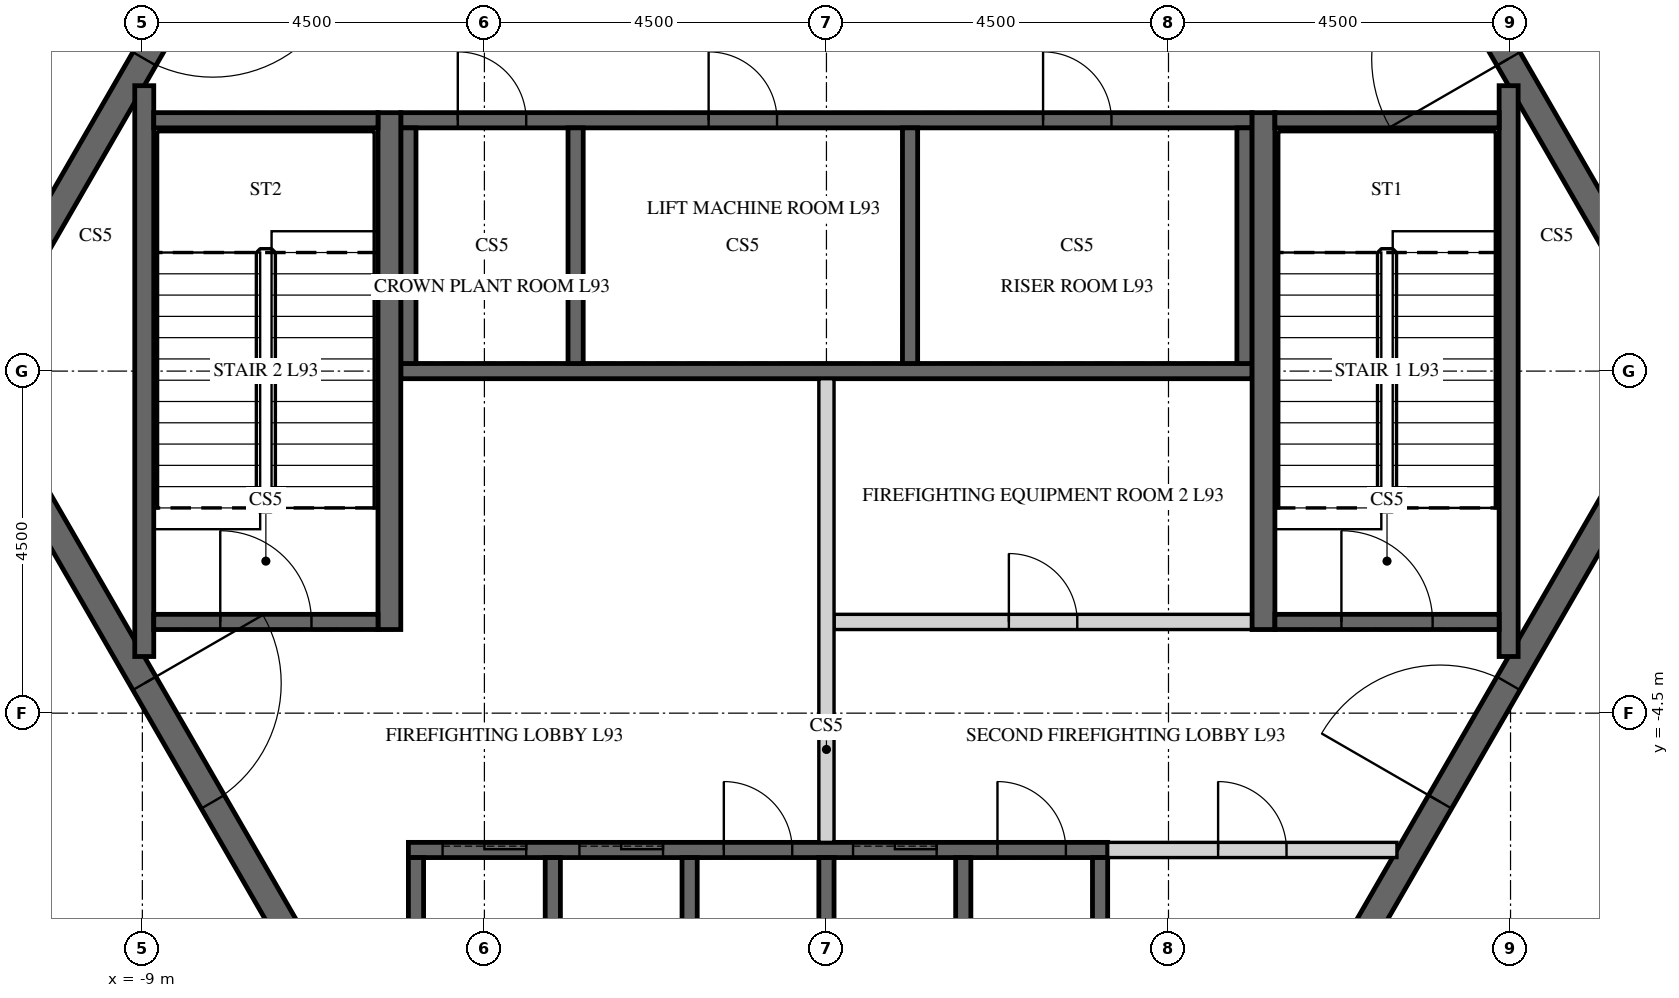
"""IFC4 building model, lengths in metres.
Left out: names, types, materials, properties, quantities, classifications, styles, units other than length and angle.
Written with IfcOpenShell. Run it as: python <this file> out.ifc"""

import sys

from ifc_helpers import new_model, si_unit, direction, frame, frame_2d, origin, place, context, subcontext, project, spatial, polyline, rectangle, outline, extrude, element, fill, save


model = new_model("IFC4")
c1 = context("Model", 3, precision=1e-05, world=origin(), true_north=direction((0.0, 1.0)))
c2 = subcontext(c1, "Body", "Model", "MODEL_VIEW")
j1 = project(units=[si_unit("LENGTHUNIT", "METRE"), si_unit("PLANEANGLEUNIT", "RADIAN")], contexts=[c1])
p1 = place(None, origin())
s1 = spatial("IfcSite", under=j1, at=p1, CompositionType="ELEMENT")
p2 = place(p1, origin())
s2 = spatial("IfcBuilding", under=s1, at=p2, CompositionType="ELEMENT")
p3 = place(p2, frame((0.0, 0.0, 392.7)))
s3 = spatial("IfcBuildingStorey", under=s2, at=p3, CompositionType="ELEMENT", Elevation=392.7)
p4 = place(p3, frame((-5.673, 9.825, -0.2), z_axis=(0.0, 0.0, 1.0), x_axis=(-0.499995046907, -0.866028263435, 0.0)))
e1 = element("IfcWall", 1, at=p4, inside=s3, PredefinedType="SHEAR", context=c2, shape_type="SweptSolid", body=[
    extrude(outline(polyline([(-0.101, -0.175), (11.446, -0.175), (11.244, 0.175), (0.101, 0.175), (-0.101, -0.175)])), origin(), (0.0, 0.0, 1.0), 4.5),
])
p5 = place(p4, frame((4.801, 0.0, 0.2)))
e2 = element("IfcOpeningElement", 2, at=p5, cuts=e1, PredefinedType="OPENING", context=c2, shape_type="SweptSolid", body=[
    extrude(rectangle(XDim=1.8, YDim=2.4, at=frame_2d((0.9, 1.2))), frame((0.0, 0.185, 0.0), z_axis=(0.0, -1.0, 0.0), x_axis=(1.0, 0.0, 0.0)), (0.0, 0.0, 1.0), 0.37),
])
p6 = place(p3, frame((-11.345, 0.0, -0.2), z_axis=(0.0, 0.0, 1.0), x_axis=(0.499995046907, -0.866028263435, 0.0)))
e3 = element("IfcWall", 3, at=p6, inside=s3, PredefinedType="SHEAR", context=c2, shape_type="SweptSolid", body=[
    extrude(outline(polyline([(-0.101, -0.175), (11.446, -0.175), (11.244, 0.175), (0.101, 0.175), (-0.101, -0.175)])), origin(), (0.0, 0.0, 1.0), 4.5),
])
p7 = place(p6, frame((4.744, 0.0, 0.2)))
e4 = element("IfcOpeningElement", 4, at=p7, cuts=e3, PredefinedType="OPENING", context=c2, shape_type="SweptSolid", body=[
    extrude(rectangle(XDim=1.8, YDim=2.4, at=frame_2d((0.9, 1.2))), frame((0.0, 0.185, 0.0), z_axis=(0.0, -1.0, 0.0), x_axis=(1.0, 0.0, 0.0)), (0.0, 0.0, 1.0), 0.37),
])
p8 = place(p3, frame((5.673, -9.825, -0.2), z_axis=(0.0, 0.0, 1.0), x_axis=(0.499995046907, 0.866028263435, 0.0)))
e5 = element("IfcWall", 5, at=p8, inside=s3, PredefinedType="SHEAR", context=c2, shape_type="SweptSolid", body=[
    extrude(outline(polyline([(-0.101, -0.175), (11.446, -0.175), (11.244, 0.175), (0.101, 0.175), (-0.101, -0.175)])), origin(), (0.0, 0.0, 1.0), 4.5),
])
p9 = place(p8, frame((4.801, 0.0, 0.2)))
e6 = element("IfcOpeningElement", 6, at=p9, cuts=e5, PredefinedType="OPENING", context=c2, shape_type="SweptSolid", body=[
    extrude(rectangle(XDim=1.8, YDim=2.4, at=frame_2d((0.9, 1.2))), frame((0.0, 0.185, 0.0), z_axis=(0.0, -1.0, 0.0), x_axis=(1.0, 0.0, 0.0)), (0.0, 0.0, 1.0), 0.37),
])
p10 = place(p3, frame((11.345, 0.0, -0.2), z_axis=(0.0, 0.0, 1.0), x_axis=(-0.499995046907, 0.866028263435, 0.0)))
e7 = element("IfcWall", 7, at=p10, inside=s3, PredefinedType="SHEAR", context=c2, shape_type="SweptSolid", body=[
    extrude(outline(polyline([(-0.101, -0.175), (11.446, -0.175), (11.244, 0.175), (0.101, 0.175), (-0.101, -0.175)])), origin(), (0.0, 0.0, 1.0), 4.5),
])
p11 = place(p10, frame((4.744, 0.0, 0.2)))
e8 = element("IfcOpeningElement", 8, at=p11, cuts=e7, PredefinedType="OPENING", context=c2, shape_type="SweptSolid", body=[
    extrude(rectangle(XDim=1.8, YDim=2.4, at=frame_2d((0.9, 1.2))), frame((0.0, 0.185, 0.0), z_axis=(0.0, -1.0, 0.0), x_axis=(1.0, 0.0, 0.0)), (0.0, 0.0, 1.0), 0.37),
])
p12 = place(p3, frame((-5.6, 3.3, -0.2), z_axis=(0.0, 0.0, 1.0), x_axis=(1.0, 0.0, 0.0)))
e9 = element("IfcWall", 9, at=p12, inside=s3, PredefinedType="SHEAR", context=c2, shape_type="SweptSolid", body=[
    extrude(rectangle(XDim=11.2, YDim=0.2, at=frame_2d((5.6, 0.0))), origin(), (0.0, 0.0, 1.0), 4.5),
])
p13 = place(p12, frame((0.75, 0.0, 0.2)))
e10 = element("IfcOpeningElement", 10, at=p13, cuts=e9, PredefinedType="OPENING", context=c2, shape_type="SweptSolid", body=[
    extrude(rectangle(XDim=0.9, YDim=2.1, at=frame_2d((0.45, 1.05))), frame((0.0, 0.11, 0.0), z_axis=(0.0, -1.0, 0.0), x_axis=(1.0, 0.0, 0.0)), (0.0, 0.0, 1.0), 0.22),
])
p14 = place(p12, frame((4.05, 0.0, 0.2)))
e11 = element("IfcOpeningElement", 11, at=p14, cuts=e9, PredefinedType="OPENING", context=c2, shape_type="SweptSolid", body=[
    extrude(rectangle(XDim=0.9, YDim=2.1, at=frame_2d((0.45, 1.05))), frame((0.0, 0.11, 0.0), z_axis=(0.0, -1.0, 0.0), x_axis=(1.0, 0.0, 0.0)), (0.0, 0.0, 1.0), 0.22),
])
p15 = place(p12, frame((8.45, 0.0, 0.2)))
e12 = element("IfcOpeningElement", 12, at=p15, cuts=e9, PredefinedType="OPENING", context=c2, shape_type="SweptSolid", body=[
    extrude(rectangle(XDim=0.9, YDim=2.1, at=frame_2d((0.45, 1.05))), frame((0.0, 0.11, 0.0), z_axis=(0.0, -1.0, 0.0), x_axis=(1.0, 0.0, 0.0)), (0.0, 0.0, 1.0), 0.22),
])
p16 = place(p3, frame((-5.6, 0.0, -0.2), z_axis=(0.0, 0.0, 1.0), x_axis=(1.0, 0.0, 0.0)))
e13 = element("IfcWall", 13, at=p16, inside=s3, PredefinedType="SHEAR", context=c2, shape_type="SweptSolid", body=[
    extrude(rectangle(XDim=11.2, YDim=0.2, at=frame_2d((5.6, 0.0))), origin(), (0.0, 0.0, 1.0), 4.5),
])
for number, where, z_axis, x_axis in (
    (14, (-5.5, 0.1, -0.2), (0.0, 0.0, 1.0), (0.0, 1.0, 0.0)),
    (15, (-3.3, 0.1, -0.2), (0.0, 0.0, 1.0), (0.0, 1.0, 0.0)),
    (16, (1.1, 0.1, -0.2), (0.0, 0.0, 1.0), (0.0, 1.0, 0.0)),
    (17, (5.5, 0.1, -0.2), (0.0, 0.0, 1.0), (0.0, 1.0, 0.0)),
):
    element("IfcWall", number, at=place(p3, frame(where, z_axis=z_axis, x_axis=x_axis)), inside=s3, PredefinedType="SHEAR", context=c2, shape_type="SweptSolid", body=[
        extrude(rectangle(XDim=3.1, YDim=0.2, at=frame_2d((1.55, 0.0))), origin(), (0.0, 0.0, 1.0), 4.5),
    ])
p17 = place(p3, frame((-5.5, -6.3, -0.2), z_axis=(0.0, 0.0, 1.0), x_axis=(1.0, 0.0, 0.0)))
e18 = element("IfcWall", 18, at=p17, inside=s3, PredefinedType="SHEAR", context=c2, shape_type="SweptSolid", body=[
    extrude(rectangle(XDim=9.2, YDim=0.2, at=frame_2d((4.6, 0.0))), origin(), (0.0, 0.0, 1.0), 4.5),
])
p18 = place(p17, frame((4.15, 0.0, 0.2)))
e19 = element("IfcOpeningElement", 19, at=p18, cuts=e18, PredefinedType="OPENING", context=c2, shape_type="SweptSolid", body=[
    extrude(rectangle(XDim=0.9, YDim=2.1, at=frame_2d((0.45, 1.05))), frame((0.0, 0.11, 0.0), z_axis=(0.0, -1.0, 0.0), x_axis=(1.0, 0.0, 0.0)), (0.0, 0.0, 1.0), 0.22),
])
p19 = place(p17, frame((7.75, 0.0, 0.2)))
e20 = element("IfcOpeningElement", 20, at=p19, cuts=e18, PredefinedType="OPENING", context=c2, shape_type="SweptSolid", body=[
    extrude(rectangle(XDim=0.9, YDim=2.1, at=frame_2d((0.45, 1.05))), frame((0.0, 0.11, 0.0), z_axis=(0.0, -1.0, 0.0), x_axis=(1.0, 0.0, 0.0)), (0.0, 0.0, 1.0), 0.22),
])
p20 = place(p17, frame((0.45, 0.0, 0.2)))
e21 = element("IfcOpeningElement", 21, at=p20, cuts=e18, PredefinedType="OPENING", context=c2, shape_type="SweptSolid", body=[
    extrude(rectangle(XDim=1.1, YDim=2.1, at=frame_2d((0.55, 1.05))), frame((0.0, 0.11, 0.0), z_axis=(0.0, -1.0, 0.0), x_axis=(1.0, 0.0, 0.0)), (0.0, 0.0, 1.0), 0.22),
])
p21 = place(p17, frame((2.25, 0.0, 0.2)))
e22 = element("IfcOpeningElement", 22, at=p21, cuts=e18, PredefinedType="OPENING", context=c2, shape_type="SweptSolid", body=[
    extrude(rectangle(XDim=1.1, YDim=2.1, at=frame_2d((0.55, 1.05))), frame((0.0, 0.11, 0.0), z_axis=(0.0, -1.0, 0.0), x_axis=(1.0, 0.0, 0.0)), (0.0, 0.0, 1.0), 0.22),
])
p22 = place(p17, frame((5.85, 0.0, 0.2)))
e23 = element("IfcOpeningElement", 23, at=p22, cuts=e18, PredefinedType="OPENING", context=c2, shape_type="SweptSolid", body=[
    extrude(rectangle(XDim=1.1, YDim=2.1, at=frame_2d((0.55, 1.05))), frame((0.0, 0.11, 0.0), z_axis=(0.0, -1.0, 0.0), x_axis=(1.0, 0.0, 0.0)), (0.0, 0.0, 1.0), 0.22),
])
for number, where, z_axis, x_axis in (
    (24, (-5.4, -9.3, -0.2), (0.0, 0.0, 1.0), (0.0, 1.0, 0.0)),
    (25, (-3.6, -9.3, -0.2), (0.0, 0.0, 1.0), (0.0, 1.0, 0.0)),
    (26, (-1.8, -9.3, -0.2), (0.0, 0.0, 1.0), (0.0, 1.0, 0.0)),
    (27, (0.0, -9.3, -0.2), (0.0, 0.0, 1.0), (0.0, 1.0, 0.0)),
    (28, (1.8, -9.3, -0.2), (0.0, 0.0, 1.0), (0.0, 1.0, 0.0)),
    (29, (3.6, -9.3, -0.2), (0.0, 0.0, 1.0), (0.0, 1.0, 0.0)),
):
    element("IfcWall", number, at=place(p3, frame(where, z_axis=z_axis, x_axis=x_axis)), inside=s3, PredefinedType="SHEAR", context=c2, shape_type="SweptSolid", body=[
        extrude(rectangle(XDim=2.9, YDim=0.2, at=frame_2d((1.45, 0.0))), origin(), (0.0, 0.0, 1.0), 4.5),
    ])
p23 = place(p3, frame((0.1, -3.3, 0.0), z_axis=(0.0, 0.0, 1.0), x_axis=(1.0, 0.0, 0.0)))
e30 = element("IfcWall", 30, at=p23, inside=s3, PredefinedType="PARTITIONING", context=c2, shape_type="SweptSolid", body=[
    extrude(rectangle(XDim=5.5, YDim=0.2, at=frame_2d((2.75, 0.0))), origin(), (0.0, 0.0, 1.0), 4.3),
])
p24 = place(p23, frame((2.3, 0.0, 0.0)))
e31 = element("IfcOpeningElement", 31, at=p24, cuts=e30, PredefinedType="OPENING", context=c2, shape_type="SweptSolid", body=[
    extrude(rectangle(XDim=0.9, YDim=2.1, at=frame_2d((0.45, 1.05))), frame((0.0, 0.11, 0.0), z_axis=(0.0, -1.0, 0.0), x_axis=(1.0, 0.0, 0.0)), (0.0, 0.0, 1.0), 0.22),
])
p25 = place(p3, frame((0.0, -6.2, 0.0), z_axis=(0.0, 0.0, 1.0), x_axis=(0.0, 1.0, 0.0)))
e32 = element("IfcWall", 32, at=p25, inside=s3, PredefinedType="PARTITIONING", context=c2, shape_type="SweptSolid", body=[
    extrude(rectangle(XDim=6.1, YDim=0.2, at=frame_2d((3.05, 0.0))), origin(), (0.0, 0.0, 1.0), 4.3),
])
p26 = place(p3, frame((3.7, -6.3, 0.0), z_axis=(0.0, 0.0, 1.0), x_axis=(1.0, 0.0, 0.0)))
e33 = element("IfcWall", 33, at=p26, inside=s3, PredefinedType="PARTITIONING", context=c2, shape_type="SweptSolid", body=[
    extrude(rectangle(XDim=3.806, YDim=0.2, at=frame_2d((1.903, 0.0))), origin(), (0.0, 0.0, 1.0), 4.3),
])
p27 = place(p26, frame((1.453, 0.0, 0.0)))
e34 = element("IfcOpeningElement", 34, at=p27, cuts=e33, PredefinedType="OPENING", context=c2, shape_type="SweptSolid", body=[
    extrude(rectangle(XDim=0.9, YDim=2.1, at=frame_2d((0.45, 1.05))), frame((0.0, 0.11, 0.0), z_axis=(0.0, -1.0, 0.0), x_axis=(1.0, 0.0, 0.0)), (0.0, 0.0, 1.0), 0.22),
])
p28 = place(p3, frame((5.75, -3.4, -0.2), z_axis=(0.0, 0.0, 1.0), x_axis=(0.0, 1.0, 0.0)))
e35 = element("IfcWall", 35, at=p28, inside=s3, PredefinedType="SHEAR", context=c2, shape_type="SweptSolid", body=[
    extrude(rectangle(XDim=6.8, YDim=0.3, at=frame_2d((3.4, 0.0))), origin(), (0.0, 0.0, 1.0), 4.5),
])
p29 = place(p3, frame((8.975, -3.755, -0.2), z_axis=(0.0, 0.0, 1.0), x_axis=(0.0, 1.0, 0.0)))
e36 = element("IfcWall", 36, at=p29, inside=s3, PredefinedType="SHEAR", context=c2, shape_type="SweptSolid", body=[
    extrude(rectangle(XDim=7.51, YDim=0.25, at=frame_2d((3.755, 0.0))), origin(), (0.0, 0.0, 1.0), 4.5),
])
p30 = place(p3, frame((5.9, 3.3, -0.2), z_axis=(0.0, 0.0, 1.0), x_axis=(1.0, 0.0, 0.0)))
e37 = element("IfcWall", 37, at=p30, inside=s3, PredefinedType="SHEAR", context=c2, shape_type="SweptSolid", body=[
    extrude(rectangle(XDim=2.95, YDim=0.2, at=frame_2d((1.475, 0.0))), origin(), (0.0, 0.0, 1.0), 4.5),
])
p31 = place(p3, frame((5.9, -3.3, -0.2), z_axis=(0.0, 0.0, 1.0), x_axis=(1.0, 0.0, 0.0)))
e38 = element("IfcWall", 38, at=p31, inside=s3, PredefinedType="SHEAR", context=c2, shape_type="SweptSolid", body=[
    extrude(rectangle(XDim=2.95, YDim=0.2, at=frame_2d((1.475, 0.0))), origin(), (0.0, 0.0, 1.0), 4.5),
])
p32 = place(p31, frame((0.875, 0.0, 0.2)))
e39 = element("IfcOpeningElement", 39, at=p32, cuts=e38, PredefinedType="OPENING", context=c2, shape_type="SweptSolid", body=[
    extrude(rectangle(XDim=1.2, YDim=2.4, at=frame_2d((0.6, 1.2))), frame((0.0, 0.11, 0.0), z_axis=(0.0, -1.0, 0.0), x_axis=(1.0, 0.0, 0.0)), (0.0, 0.0, 1.0), 0.22),
])
p33 = place(p3, frame((-5.75, -3.4, -0.2), z_axis=(0.0, 0.0, 1.0), x_axis=(0.0, 1.0, 0.0)))
e40 = element("IfcWall", 40, at=p33, inside=s3, PredefinedType="SHEAR", context=c2, shape_type="SweptSolid", body=[
    extrude(rectangle(XDim=6.8, YDim=0.3, at=frame_2d((3.4, 0.0))), origin(), (0.0, 0.0, 1.0), 4.5),
])
p34 = place(p3, frame((-8.975, -3.755, -0.2), z_axis=(0.0, 0.0, 1.0), x_axis=(0.0, 1.0, 0.0)))
e41 = element("IfcWall", 41, at=p34, inside=s3, PredefinedType="SHEAR", context=c2, shape_type="SweptSolid", body=[
    extrude(rectangle(XDim=7.51, YDim=0.25, at=frame_2d((3.755, 0.0))), origin(), (0.0, 0.0, 1.0), 4.5),
])
p35 = place(p3, frame((-8.85, 3.3, -0.2), z_axis=(0.0, 0.0, 1.0), x_axis=(1.0, 0.0, 0.0)))
e42 = element("IfcWall", 42, at=p35, inside=s3, PredefinedType="SHEAR", context=c2, shape_type="SweptSolid", body=[
    extrude(rectangle(XDim=2.95, YDim=0.2, at=frame_2d((1.475, 0.0))), origin(), (0.0, 0.0, 1.0), 4.5),
])
p36 = place(p3, frame((-8.85, -3.3, -0.2), z_axis=(0.0, 0.0, 1.0), x_axis=(1.0, 0.0, 0.0)))
e43 = element("IfcWall", 43, at=p36, inside=s3, PredefinedType="SHEAR", context=c2, shape_type="SweptSolid", body=[
    extrude(rectangle(XDim=2.95, YDim=0.2, at=frame_2d((1.475, 0.0))), origin(), (0.0, 0.0, 1.0), 4.5),
])
p37 = place(p36, frame((0.875, 0.0, 0.2)))
e44 = element("IfcOpeningElement", 44, at=p37, cuts=e43, PredefinedType="OPENING", context=c2, shape_type="SweptSolid", body=[
    extrude(rectangle(XDim=1.2, YDim=2.4, at=frame_2d((0.6, 1.2))), frame((0.0, 0.11, 0.0), z_axis=(0.0, -1.0, 0.0), x_axis=(1.0, 0.0, 0.0)), (0.0, 0.0, 1.0), 0.22),
])
p38 = place(p3, frame((16.996, -5.522, 0.0), z_axis=(0.0, 0.0, 1.0), x_axis=(-0.500004628935, -0.866022731251, 0.0)))
e45 = element("IfcWall", 45, at=p38, inside=s3, PredefinedType="PARTITIONING", context=c2, shape_type="SweptSolid", body=[
    extrude(rectangle(XDim=13.606, YDim=0.15, at=frame_2d((6.803, 0.0))), origin(), (0.0, 0.0, 1.0), 4.3),
])
p39 = place(p38, frame((6.303, 0.0, 0.0)))
e46 = element("IfcOpeningElement", 46, at=p39, cuts=e45, PredefinedType="OPENING", context=c2, shape_type="SweptSolid", body=[
    extrude(rectangle(XDim=1.0, YDim=2.1, at=frame_2d((0.5, 1.05))), frame((0.0, 0.085, 0.0), z_axis=(0.0, -1.0, 0.0), x_axis=(1.0, 0.0, 0.0)), (0.0, 0.0, 1.0), 0.17),
])
p40 = place(p5, origin())
e47 = element("IfcDoor", 47, at=p40, inside=s3, OperationType="DOUBLE_DOOR_SINGLE_SWING", PredefinedType="DOOR", context=c2, shape_type="SweptSolid", body=[
    extrude(rectangle(XDim=1.8, YDim=2.4, at=frame_2d((0.9, 1.2))), frame((0.0, 0.025, 0.0), z_axis=(0.0, -1.0, 0.0), x_axis=(1.0, 0.0, 0.0)), (0.0, 0.0, 1.0), 0.05),
])
fill(e2, e47)
p41 = place(p11, origin())
e48 = element("IfcDoor", 48, at=p41, inside=s3, OperationType="DOUBLE_DOOR_SINGLE_SWING", PredefinedType="DOOR", context=c2, shape_type="SweptSolid", body=[
    extrude(rectangle(XDim=1.8, YDim=2.4, at=frame_2d((0.9, 1.2))), frame((0.0, 0.025, 0.0), z_axis=(0.0, -1.0, 0.0), x_axis=(1.0, 0.0, 0.0)), (0.0, 0.0, 1.0), 0.05),
])
fill(e8, e48)
p42 = place(p7, origin())
e49 = element("IfcDoor", 49, at=p42, inside=s3, OperationType="DOUBLE_DOOR_SINGLE_SWING", PredefinedType="DOOR", context=c2, shape_type="SweptSolid", body=[
    extrude(rectangle(XDim=1.8, YDim=2.4, at=frame_2d((0.9, 1.2))), frame((0.0, 0.025, 0.0), z_axis=(0.0, -1.0, 0.0), x_axis=(1.0, 0.0, 0.0)), (0.0, 0.0, 1.0), 0.05),
])
fill(e4, e49)
p43 = place(p9, origin())
e50 = element("IfcDoor", 50, at=p43, inside=s3, OperationType="DOUBLE_DOOR_SINGLE_SWING", PredefinedType="DOOR", context=c2, shape_type="SweptSolid", body=[
    extrude(rectangle(XDim=1.8, YDim=2.4, at=frame_2d((0.9, 1.2))), frame((0.0, 0.025, 0.0), z_axis=(0.0, -1.0, 0.0), x_axis=(1.0, 0.0, 0.0)), (0.0, 0.0, 1.0), 0.05),
])
fill(e6, e50)
p44 = place(p24, origin())
e51 = element("IfcDoor", 51, at=p44, inside=s3, OperationType="SINGLE_SWING_LEFT", PredefinedType="DOOR", context=c2, shape_type="SweptSolid", body=[
    extrude(rectangle(XDim=0.9, YDim=2.1, at=frame_2d((0.45, 1.05))), frame((0.0, 0.025, 0.0), z_axis=(0.0, -1.0, 0.0), x_axis=(1.0, 0.0, 0.0)), (0.0, 0.0, 1.0), 0.05),
])
fill(e31, e51)
p45 = place(p27, origin())
e52 = element("IfcDoor", 52, at=p45, inside=s3, OperationType="SINGLE_SWING_LEFT", PredefinedType="DOOR", context=c2, shape_type="SweptSolid", body=[
    extrude(rectangle(XDim=0.9, YDim=2.1, at=frame_2d((0.45, 1.05))), frame((0.0, 0.025, 0.0), z_axis=(0.0, -1.0, 0.0), x_axis=(1.0, 0.0, 0.0)), (0.0, 0.0, 1.0), 0.05),
])
fill(e34, e52)
p46 = place(p13, origin())
e53 = element("IfcDoor", 53, at=p46, inside=s3, OperationType="SINGLE_SWING_LEFT", PredefinedType="DOOR", context=c2, shape_type="SweptSolid", body=[
    extrude(rectangle(XDim=0.9, YDim=2.1, at=frame_2d((0.45, 1.05))), frame((0.0, 0.025, 0.0), z_axis=(0.0, -1.0, 0.0), x_axis=(1.0, 0.0, 0.0)), (0.0, 0.0, 1.0), 0.05),
])
fill(e10, e53)
p47 = place(p14, origin())
e54 = element("IfcDoor", 54, at=p47, inside=s3, OperationType="SINGLE_SWING_LEFT", PredefinedType="DOOR", context=c2, shape_type="SweptSolid", body=[
    extrude(rectangle(XDim=0.9, YDim=2.1, at=frame_2d((0.45, 1.05))), frame((0.0, 0.025, 0.0), z_axis=(0.0, -1.0, 0.0), x_axis=(1.0, 0.0, 0.0)), (0.0, 0.0, 1.0), 0.05),
])
fill(e11, e54)
p48 = place(p15, origin())
e55 = element("IfcDoor", 55, at=p48, inside=s3, OperationType="SINGLE_SWING_LEFT", PredefinedType="DOOR", context=c2, shape_type="SweptSolid", body=[
    extrude(rectangle(XDim=0.9, YDim=2.1, at=frame_2d((0.45, 1.05))), frame((0.0, 0.025, 0.0), z_axis=(0.0, -1.0, 0.0), x_axis=(1.0, 0.0, 0.0)), (0.0, 0.0, 1.0), 0.05),
])
fill(e12, e55)
p49 = place(p18, origin())
e56 = element("IfcDoor", 56, at=p49, inside=s3, OperationType="SINGLE_SWING_LEFT", PredefinedType="DOOR", context=c2, shape_type="SweptSolid", body=[
    extrude(rectangle(XDim=0.9, YDim=2.1, at=frame_2d((0.45, 1.05))), frame((0.0, 0.025, 0.0), z_axis=(0.0, -1.0, 0.0), x_axis=(1.0, 0.0, 0.0)), (0.0, 0.0, 1.0), 0.05),
])
fill(e19, e56)
p50 = place(p19, origin())
e57 = element("IfcDoor", 57, at=p50, inside=s3, OperationType="SINGLE_SWING_LEFT", PredefinedType="DOOR", context=c2, shape_type="SweptSolid", body=[
    extrude(rectangle(XDim=0.9, YDim=2.1, at=frame_2d((0.45, 1.05))), frame((0.0, 0.025, 0.0), z_axis=(0.0, -1.0, 0.0), x_axis=(1.0, 0.0, 0.0)), (0.0, 0.0, 1.0), 0.05),
])
fill(e20, e57)
p51 = place(p32, origin())
e58 = element("IfcDoor", 58, at=p51, inside=s3, OperationType="SINGLE_SWING_LEFT", PredefinedType="DOOR", context=c2, shape_type="SweptSolid", body=[
    extrude(rectangle(XDim=1.2, YDim=2.4, at=frame_2d((0.6, 1.2))), frame((0.0, 0.025, 0.0), z_axis=(0.0, -1.0, 0.0), x_axis=(1.0, 0.0, 0.0)), (0.0, 0.0, 1.0), 0.05),
])
fill(e39, e58)
p52 = place(p37, origin())
e59 = element("IfcDoor", 59, at=p52, inside=s3, OperationType="SINGLE_SWING_LEFT", PredefinedType="DOOR", context=c2, shape_type="SweptSolid", body=[
    extrude(rectangle(XDim=1.2, YDim=2.4, at=frame_2d((0.6, 1.2))), frame((0.0, 0.025, 0.0), z_axis=(0.0, -1.0, 0.0), x_axis=(1.0, 0.0, 0.0)), (0.0, 0.0, 1.0), 0.05),
])
fill(e44, e59)
p53 = place(p20, origin())
e60 = element("IfcDoor", 60, at=p53, inside=s3, OperationType="SLIDING_TO_LEFT", PredefinedType="DOOR", context=c2, shape_type="SweptSolid", body=[
    extrude(rectangle(XDim=1.1, YDim=2.1, at=frame_2d((0.55, 1.05))), frame((0.0, 0.025, 0.0), z_axis=(0.0, -1.0, 0.0), x_axis=(1.0, 0.0, 0.0)), (0.0, 0.0, 1.0), 0.05),
])
fill(e21, e60)
p54 = place(p21, origin())
e61 = element("IfcDoor", 61, at=p54, inside=s3, OperationType="SLIDING_TO_LEFT", PredefinedType="DOOR", context=c2, shape_type="SweptSolid", body=[
    extrude(rectangle(XDim=1.1, YDim=2.1, at=frame_2d((0.55, 1.05))), frame((0.0, 0.025, 0.0), z_axis=(0.0, -1.0, 0.0), x_axis=(1.0, 0.0, 0.0)), (0.0, 0.0, 1.0), 0.05),
])
fill(e22, e61)
p55 = place(p22, origin())
e62 = element("IfcDoor", 62, at=p55, inside=s3, OperationType="SLIDING_TO_LEFT", PredefinedType="DOOR", context=c2, shape_type="SweptSolid", body=[
    extrude(rectangle(XDim=1.1, YDim=2.1, at=frame_2d((0.55, 1.05))), frame((0.0, 0.025, 0.0), z_axis=(0.0, -1.0, 0.0), x_axis=(1.0, 0.0, 0.0)), (0.0, 0.0, 1.0), 0.05),
])
fill(e23, e62)
save(model, sys.argv[1])
